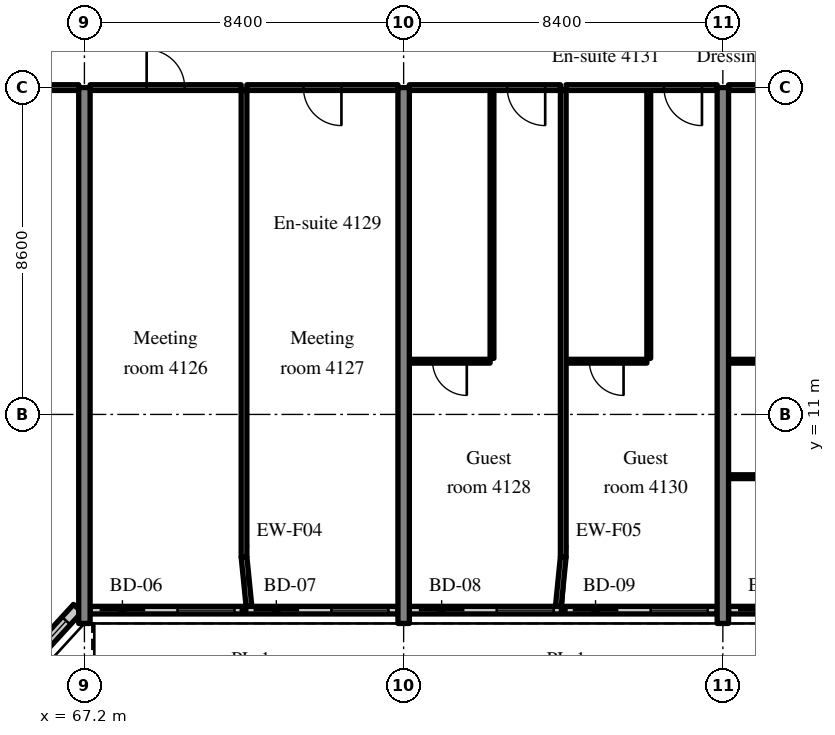
"""IFC4 building model, lengths in metres.
Left out: names, types, materials, properties, quantities, classifications, styles, units other than length and angle.
Written with IfcOpenShell. Run it as: python <this file> out.ifc"""

import sys

from ifc_helpers import new_model, si_unit, direction, frame, frame_2d, origin, place, context, subcontext, project, spatial, rectangle, extrude, source, transform, mapped, element, fill, save


model = new_model("IFC4")
c1 = context("Model", 3, precision=1e-05, world=origin(), true_north=direction((0.0, 1.0)))
c2 = subcontext(c1, "Body", "Model", "MODEL_VIEW")
j1 = project(units=[si_unit("LENGTHUNIT", "METRE"), si_unit("PLANEANGLEUNIT", "RADIAN")], contexts=[c1])
p1 = place(None, origin())
s1 = spatial("IfcSite", under=j1, at=p1, CompositionType="ELEMENT")
p2 = place(p1, origin())
s2 = spatial("IfcBuilding", under=s1, at=p2, CompositionType="ELEMENT")
p3 = place(p2, frame((0.0, 0.0, 170.6)))
s3 = spatial("IfcBuildingStorey", under=s2, at=p3, CompositionType="ELEMENT", Elevation=170.6)
m1 = source(origin(), c2, "Body", "SweptSolid", [
    extrude(rectangle(XDim=14.1, YDim=0.3, at=frame_2d((7.05, 0.0))), origin(), (0.0, 0.0, 1.0), 3.52),
])
for number, where, z_axis, x_axis in (
    (1, (67.2, 5.5, 0.0), (0.0, 0.0, 1.0), (0.0, 1.0, 0.0)),
    (2, (75.6, 5.5, 0.0), (0.0, 0.0, 1.0), (0.0, 1.0, 0.0)),
    (3, (84.0, 5.5, 0.0), (0.0, 0.0, 1.0), (0.0, 1.0, 0.0)),
):
    element("IfcWall", number, at=place(p3, frame(where, z_axis=z_axis, x_axis=x_axis)), inside=s3, PredefinedType="SHEAR", context=c2, shape_type="MappedRepresentation", body=[
        mapped(m1, transform((0.0, 0.0, 0.0), scale=1.0)),
    ])
m2 = source(origin(), c2, "Body", "SweptSolid", [
    extrude(rectangle(XDim=2.398, YDim=0.3, at=frame_2d((1.199, 0.0))), origin(), (0.0, 0.0, 1.0), 3.52),
])
p4 = place(p3, frame((65.404, 4.131, 0.0), z_axis=(0.0, 0.0, 1.0), x_axis=(0.675374189419, 0.737475222815, 0.0)))
e4 = element("IfcWall", 4, at=p4, inside=s3, PredefinedType="SOLIDWALL", context=c2, shape_type="MappedRepresentation", body=[
    mapped(m2, transform((0.0, 0.0, 0.0), scale=1.0)),
])
m3 = source(origin(), c2, "Body", "SweptSolid", [
    extrude(rectangle(XDim=1.5, YDim=2.0, at=frame_2d((0.75, 1.0))), frame((0.0, 0.16, 0.0), z_axis=(0.0, -1.0, 0.0), x_axis=(1.0, 0.0, 0.0)), (0.0, 0.0, 1.0), 0.32),
])
p5 = place(p4, frame((0.449, 0.0, 0.9)))
e5 = element("IfcOpeningElement", 5, at=p5, cuts=e4, PredefinedType="OPENING", context=c2, shape_type="MappedRepresentation", body=[
    mapped(m3, transform((0.0, 0.0, 0.0), scale=1.0)),
])
m4 = source(origin(), c2, "Body", "SweptSolid", [
    extrude(rectangle(XDim=8.1, YDim=0.2, at=frame_2d((4.05, 0.0))), origin(), (0.0, 0.0, 1.0), 2.87),
])
p6 = place(p3, frame((67.35, 5.85, 0.0), z_axis=(0.0, 0.0, 1.0), x_axis=(1.0, 0.0, 0.0)))
e6 = element("IfcWall", 6, at=p6, inside=s3, PredefinedType="SOLIDWALL", context=c2, shape_type="MappedRepresentation", body=[
    mapped(m4, transform((0.0, 0.0, 0.0), scale=1.0)),
])
m5 = source(origin(), c2, "Body", "SweptSolid", [
    extrude(rectangle(XDim=1.2, YDim=2.4, at=frame_2d((0.6, 1.2))), frame((0.0, 0.11, 0.0), z_axis=(0.0, -1.0, 0.0), x_axis=(1.0, 0.0, 0.0)), (0.0, 0.0, 1.0), 0.22),
])
p7 = place(p6, frame((0.25, 0.0, 0.0)))
e7 = element("IfcOpeningElement", 7, at=p7, cuts=e6, PredefinedType="OPENING", context=c2, shape_type="MappedRepresentation", body=[
    mapped(m5, transform((0.0, 0.0, 0.0), scale=1.0)),
])
m6 = source(origin(), c2, "Body", "SweptSolid", [
    extrude(rectangle(XDim=1.5, YDim=1.5, at=frame_2d((0.75, 0.75))), frame((0.0, 0.11, 0.0), z_axis=(0.0, -1.0, 0.0), x_axis=(1.0, 0.0, 0.0)), (0.0, 0.0, 1.0), 0.22),
])
p8 = place(p6, frame((2.3, 0.0, 0.9)))
e8 = element("IfcOpeningElement", 8, at=p8, cuts=e6, PredefinedType="OPENING", context=c2, shape_type="MappedRepresentation", body=[
    mapped(m6, transform((0.0, 0.0, 0.0), scale=1.0)),
])
p9 = place(p6, frame((4.3, 0.0, 0.0)))
e9 = element("IfcOpeningElement", 9, at=p9, cuts=e6, PredefinedType="OPENING", context=c2, shape_type="MappedRepresentation", body=[
    mapped(m5, transform((0.0, 0.0, 0.0), scale=1.0)),
])
p10 = place(p6, frame((6.35, 0.0, 0.9)))
e10 = element("IfcOpeningElement", 10, at=p10, cuts=e6, PredefinedType="OPENING", context=c2, shape_type="MappedRepresentation", body=[
    mapped(m6, transform((0.0, 0.0, 0.0), scale=1.0)),
])
m7 = source(origin(), c2, "Body", "SweptSolid", [
    extrude(rectangle(XDim=8.1, YDim=0.2, at=frame_2d((4.05, 0.0))), origin(), (0.0, 0.0, 1.0), 2.87),
])
p11 = place(p3, frame((75.75, 5.85, 0.0), z_axis=(0.0, 0.0, 1.0), x_axis=(1.0, 0.0, 0.0)))
e11 = element("IfcWall", 11, at=p11, inside=s3, PredefinedType="SOLIDWALL", context=c2, shape_type="MappedRepresentation", body=[
    mapped(m7, transform((0.0, 0.0, 0.0), scale=1.0)),
])
p12 = place(p11, frame((0.25, 0.0, 0.0)))
e12 = element("IfcOpeningElement", 12, at=p12, cuts=e11, PredefinedType="OPENING", context=c2, shape_type="MappedRepresentation", body=[
    mapped(m5, transform((0.0, 0.0, 0.0), scale=1.0)),
])
p13 = place(p11, frame((2.3, 0.0, 0.9)))
e13 = element("IfcOpeningElement", 13, at=p13, cuts=e11, PredefinedType="OPENING", context=c2, shape_type="MappedRepresentation", body=[
    mapped(m6, transform((0.0, 0.0, 0.0), scale=1.0)),
])
p14 = place(p11, frame((4.3, 0.0, 0.0)))
e14 = element("IfcOpeningElement", 14, at=p14, cuts=e11, PredefinedType="OPENING", context=c2, shape_type="MappedRepresentation", body=[
    mapped(m5, transform((0.0, 0.0, 0.0), scale=1.0)),
])
p15 = place(p11, frame((6.35, 0.0, 0.9)))
e15 = element("IfcOpeningElement", 15, at=p15, cuts=e11, PredefinedType="OPENING", context=c2, shape_type="MappedRepresentation", body=[
    mapped(m6, transform((0.0, 0.0, 0.0), scale=1.0)),
])
m8 = source(origin(), c2, "Body", "SweptSolid", [
    extrude(rectangle(XDim=4.105, YDim=0.2, at=frame_2d((2.052, 0.0))), origin(), (0.0, 0.0, 1.0), 2.87),
])
p16 = place(p3, frame((84.15, 5.85, 0.0), z_axis=(0.0, 0.0, 1.0), x_axis=(1.0, 0.0, 0.0)))
e16 = element("IfcWall", 16, at=p16, inside=s3, PredefinedType="SOLIDWALL", context=c2, shape_type="MappedRepresentation", body=[
    mapped(m8, transform((0.0, 0.0, 0.0), scale=1.0)),
])
p17 = place(p16, frame((0.25, 0.0, 0.0)))
e17 = element("IfcOpeningElement", 17, at=p17, cuts=e16, PredefinedType="OPENING", context=c2, shape_type="MappedRepresentation", body=[
    mapped(m5, transform((0.0, 0.0, 0.0), scale=1.0)),
])
p18 = place(p16, frame((2.355, 0.0, 0.9)))
e18 = element("IfcOpeningElement", 18, at=p18, cuts=e16, PredefinedType="OPENING", context=c2, shape_type="MappedRepresentation", body=[
    mapped(m6, transform((0.0, 0.0, 0.0), scale=1.0)),
])
m9 = source(origin(), c2, "Body", "SweptSolid", [
    extrude(rectangle(XDim=3.975, YDim=0.15, at=frame_2d((1.988, 0.0))), origin(), (0.0, 0.0, 1.0), 2.82),
])
p19 = place(p3, frame((63.075, 19.6, 0.0), z_axis=(0.0, 0.0, 1.0), x_axis=(1.0, 0.0, 0.0)))
e19 = element("IfcWall", 19, at=p19, inside=s3, PredefinedType="PARTITIONING", context=c2, shape_type="MappedRepresentation", body=[
    mapped(m9, transform((0.0, 0.0, 0.0), scale=1.0)),
])
m10 = source(origin(), c2, "Body", "SweptSolid", [
    extrude(rectangle(XDim=1.0, YDim=2.1, at=frame_2d((0.5, 1.05))), frame((0.0, 0.085, 0.0), z_axis=(0.0, -1.0, 0.0), x_axis=(1.0, 0.0, 0.0)), (0.0, 0.0, 1.0), 0.17),
])
p20 = place(p19, frame((1.487, 0.0, 0.0)))
e20 = element("IfcOpeningElement", 20, at=p20, cuts=e19, PredefinedType="OPENING", context=c2, shape_type="MappedRepresentation", body=[
    mapped(m10, transform((0.0, 0.0, 0.0), scale=1.0)),
])
m11 = source(origin(), c2, "Body", "SweptSolid", [
    extrude(rectangle(XDim=3.975, YDim=0.15, at=frame_2d((1.987, 0.0))), origin(), (0.0, 0.0, 1.0), 2.82),
])
p21 = place(p3, frame((67.35, 19.6, 0.0), z_axis=(0.0, 0.0, 1.0), x_axis=(1.0, 0.0, 0.0)))
e21 = element("IfcWall", 21, at=p21, inside=s3, PredefinedType="PARTITIONING", context=c2, shape_type="MappedRepresentation", body=[
    mapped(m11, transform((0.0, 0.0, 0.0), scale=1.0)),
])
p22 = place(p21, frame((1.488, 0.0, 0.0)))
e22 = element("IfcOpeningElement", 22, at=p22, cuts=e21, PredefinedType="OPENING", context=c2, shape_type="MappedRepresentation", body=[
    mapped(m10, transform((0.0, 0.0, 0.0), scale=1.0)),
])
p23 = place(p3, frame((71.475, 19.6, 0.0), z_axis=(0.0, 0.0, 1.0), x_axis=(1.0, 0.0, 0.0)))
e23 = element("IfcWall", 23, at=p23, inside=s3, PredefinedType="PARTITIONING", context=c2, shape_type="MappedRepresentation", body=[
    mapped(m11, transform((0.0, 0.0, 0.0), scale=1.0)),
])
p24 = place(p23, frame((1.488, 0.0, 0.0)))
e24 = element("IfcOpeningElement", 24, at=p24, cuts=e23, PredefinedType="OPENING", context=c2, shape_type="MappedRepresentation", body=[
    mapped(m10, transform((0.0, 0.0, 0.0), scale=1.0)),
])
m12 = source(origin(), c2, "Body", "SweptSolid", [
    extrude(rectangle(XDim=12.275, YDim=0.15, at=frame_2d((6.137, 0.0))), origin(), (0.0, 0.0, 1.0), 3.52),
])
p25 = place(p3, frame((71.4, 7.25, 0.0), z_axis=(0.0, 0.0, 1.0), x_axis=(0.0, 1.0, 0.0)))
e25 = element("IfcWall", 25, at=p25, inside=s3, PredefinedType="PARTITIONING", context=c2, shape_type="MappedRepresentation", body=[
    mapped(m12, transform((0.0, 0.0, 0.0), scale=1.0)),
])
m13 = source(origin(), c2, "Body", "SweptSolid", [
    extrude(rectangle(XDim=7.05, YDim=0.1, at=frame_2d((3.525, 0.0))), origin(), (0.0, 0.0, 1.0), 3.52),
])
p26 = place(p3, frame((77.925, 12.475, 0.0), z_axis=(0.0, 0.0, 1.0), x_axis=(0.0, 1.0, 0.0)))
e26 = element("IfcWall", 26, at=p26, inside=s3, PredefinedType="PARTITIONING", context=c2, shape_type="MappedRepresentation", body=[
    mapped(m13, transform((0.0, 0.0, 0.0), scale=1.0)),
])
m14 = source(origin(), c2, "Body", "SweptSolid", [
    extrude(rectangle(XDim=2.125, YDim=0.1, at=frame_2d((1.062, 0.0))), origin(), (0.0, 0.0, 1.0), 3.52),
])
p27 = place(p3, frame((75.75, 12.4, 0.0), z_axis=(0.0, 0.0, 1.0), x_axis=(1.0, 0.0, 0.0)))
e27 = element("IfcWall", 27, at=p27, inside=s3, PredefinedType="PARTITIONING", context=c2, shape_type="MappedRepresentation", body=[
    mapped(m14, transform((0.0, 0.0, 0.0), scale=1.0)),
])
m15 = source(origin(), c2, "Body", "SweptSolid", [
    extrude(rectangle(XDim=0.9, YDim=2.1, at=frame_2d((0.45, 1.05))), frame((0.0, 0.06, 0.0), z_axis=(0.0, -1.0, 0.0), x_axis=(1.0, 0.0, 0.0)), (0.0, 0.0, 1.0), 0.12),
])
p28 = place(p27, frame((0.612, 0.0, 0.0)))
e28 = element("IfcOpeningElement", 28, at=p28, cuts=e27, PredefinedType="OPENING", context=c2, shape_type="MappedRepresentation", body=[
    mapped(m15, transform((0.0, 0.0, 0.0), scale=1.0)),
])
p29 = place(p3, frame((75.75, 19.6, 0.0), z_axis=(0.0, 0.0, 1.0), x_axis=(1.0, 0.0, 0.0)))
e29 = element("IfcWall", 29, at=p29, inside=s3, PredefinedType="PARTITIONING", context=c2, shape_type="MappedRepresentation", body=[
    mapped(m9, transform((0.0, 0.0, 0.0), scale=1.0)),
])
p30 = place(p29, frame((2.575, 0.0, 0.0)))
e30 = element("IfcOpeningElement", 30, at=p30, cuts=e29, PredefinedType="OPENING", context=c2, shape_type="MappedRepresentation", body=[
    mapped(m10, transform((0.0, 0.0, 0.0), scale=1.0)),
])
p31 = place(p3, frame((82.05, 12.475, 0.0), z_axis=(0.0, 0.0, 1.0), x_axis=(0.0, 1.0, 0.0)))
e31 = element("IfcWall", 31, at=p31, inside=s3, PredefinedType="PARTITIONING", context=c2, shape_type="MappedRepresentation", body=[
    mapped(m13, transform((0.0, 0.0, 0.0), scale=1.0)),
])
p32 = place(p3, frame((79.875, 12.4, 0.0), z_axis=(0.0, 0.0, 1.0), x_axis=(1.0, 0.0, 0.0)))
e32 = element("IfcWall", 32, at=p32, inside=s3, PredefinedType="PARTITIONING", context=c2, shape_type="MappedRepresentation", body=[
    mapped(m14, transform((0.0, 0.0, 0.0), scale=1.0)),
])
p33 = place(p32, frame((0.612, 0.0, 0.0)))
e33 = element("IfcOpeningElement", 33, at=p33, cuts=e32, PredefinedType="OPENING", context=c2, shape_type="MappedRepresentation", body=[
    mapped(m15, transform((0.0, 0.0, 0.0), scale=1.0)),
])
p34 = place(p3, frame((79.875, 19.6, 0.0), z_axis=(0.0, 0.0, 1.0), x_axis=(1.0, 0.0, 0.0)))
e34 = element("IfcWall", 34, at=p34, inside=s3, PredefinedType="PARTITIONING", context=c2, shape_type="MappedRepresentation", body=[
    mapped(m9, transform((0.0, 0.0, 0.0), scale=1.0)),
])
p35 = place(p34, frame((2.575, 0.0, 0.0)))
e35 = element("IfcOpeningElement", 35, at=p35, cuts=e34, PredefinedType="OPENING", context=c2, shape_type="MappedRepresentation", body=[
    mapped(m10, transform((0.0, 0.0, 0.0), scale=1.0)),
])
p36 = place(p3, frame((79.8, 7.25, 0.0), z_axis=(0.0, 0.0, 1.0), x_axis=(0.0, 1.0, 0.0)))
e36 = element("IfcWall", 36, at=p36, inside=s3, PredefinedType="PARTITIONING", context=c2, shape_type="MappedRepresentation", body=[
    mapped(m12, transform((0.0, 0.0, 0.0), scale=1.0)),
])
m16 = source(origin(), c2, "Body", "SweptSolid", [
    extrude(rectangle(XDim=2.5, YDim=0.1, at=frame_2d((1.25, 0.0))), origin(), (0.0, 0.0, 1.0), 3.52),
])
p37 = place(p3, frame((84.15, 12.4, 0.0), z_axis=(0.0, 0.0, 1.0), x_axis=(1.0, 0.0, 0.0)))
e37 = element("IfcWall", 37, at=p37, inside=s3, PredefinedType="PARTITIONING", context=c2, shape_type="MappedRepresentation", body=[
    mapped(m16, transform((0.0, 0.0, 0.0), scale=1.0)),
])
p38 = place(p37, frame((0.8, 0.0, 0.0)))
e38 = element("IfcOpeningElement", 38, at=p38, cuts=e37, PredefinedType="OPENING", context=c2, shape_type="MappedRepresentation", body=[
    mapped(m15, transform((0.0, 0.0, 0.0), scale=1.0)),
])
m17 = source(origin(), c2, "Body", "SweptSolid", [
    extrude(rectangle(XDim=7.95, YDim=0.1, at=frame_2d((3.975, 0.0))), origin(), (0.0, 0.0, 1.0), 3.52),
])
p39 = place(p3, frame((84.15, 9.362, 0.0), z_axis=(0.0, 0.0, 1.0), x_axis=(1.0, 0.0, 0.0)))
e39 = element("IfcWall", 39, at=p39, inside=s3, PredefinedType="PARTITIONING", context=c2, shape_type="MappedRepresentation", body=[
    mapped(m17, transform((0.0, 0.0, 0.0), scale=1.0)),
])
m18 = source(origin(), c2, "Body", "SweptSolid", [
    extrude(rectangle(XDim=1.8, YDim=2.1, at=frame_2d((0.9, 1.05))), frame((0.0, 0.06, 0.0), z_axis=(0.0, -1.0, 0.0), x_axis=(1.0, 0.0, 0.0)), (0.0, 0.0, 1.0), 0.12),
])
p40 = place(p39, frame((3.075, 0.0, 0.0)))
e40 = element("IfcOpeningElement", 40, at=p40, cuts=e39, PredefinedType="OPENING", context=c2, shape_type="MappedRepresentation", body=[
    mapped(m18, transform((0.0, 0.0, 0.0), scale=1.0)),
])
m19 = source(origin(), c2, "Body", "SweptSolid", [
    extrude(rectangle(XDim=7.95, YDim=0.15, at=frame_2d((3.975, 0.0))), origin(), (0.0, 0.0, 1.0), 2.82),
])
p41 = place(p3, frame((84.15, 19.6, 0.0), z_axis=(0.0, 0.0, 1.0), x_axis=(1.0, 0.0, 0.0)))
e41 = element("IfcWall", 41, at=p41, inside=s3, PredefinedType="PARTITIONING", context=c2, shape_type="MappedRepresentation", body=[
    mapped(m19, transform((0.0, 0.0, 0.0), scale=1.0)),
])
p42 = place(p41, frame((6.55, 0.0, 0.0)))
e42 = element("IfcOpeningElement", 42, at=p42, cuts=e41, PredefinedType="OPENING", context=c2, shape_type="MappedRepresentation", body=[
    mapped(m10, transform((0.0, 0.0, 0.0), scale=1.0)),
])
m20 = source(origin(), c2, "Body", "SweptSolid", [
    extrude(rectangle(XDim=1.307, YDim=0.15, at=frame_2d((0.653, 0.0))), origin(), (0.0, 0.0, 1.0), 3.52),
])
for number, where, z_axis, x_axis in (
    (43, (71.53, 5.95, 0.0), (0.0, 0.0, 1.0), (-0.1, 0.995, 0.0)),
    (44, (79.67, 5.95, 0.0), (0.0, 0.0, 1.0), (0.1, 0.995, 0.0)),
):
    element("IfcWall", number, at=place(p3, frame(where, z_axis=z_axis, x_axis=x_axis)), inside=s3, PredefinedType="PARTITIONING", context=c2, shape_type="MappedRepresentation", body=[
        mapped(m20, transform((0.0, 0.0, 0.0), scale=1.0)),
    ])
m21 = source(origin(), c2, "Body", "SweptSolid", [
    extrude(rectangle(XDim=1.5, YDim=2.0, at=frame_2d((0.75, 1.0))), frame((0.0, 0.03, 0.0), z_axis=(0.0, -1.0, 0.0), x_axis=(1.0, 0.0, 0.0)), (0.0, 0.0, 1.0), 0.06),
])
p43 = place(p5, origin())
e45 = element("IfcWindow", 45, at=p43, inside=s3, PartitioningType="SINGLE_PANEL", PredefinedType="WINDOW", context=c2, shape_type="MappedRepresentation", body=[
    mapped(m21, transform((0.0, 0.0, 0.0), scale=1.0)),
])
fill(e5, e45)
m22 = source(origin(), c2, "Body", "SweptSolid", [
    extrude(rectangle(XDim=1.2, YDim=2.4, at=frame_2d((0.6, 1.2))), frame((0.0, 0.025, 0.0), z_axis=(0.0, -1.0, 0.0), x_axis=(1.0, 0.0, 0.0)), (0.0, 0.0, 1.0), 0.05),
])
p44 = place(p7, origin())
e46 = element("IfcDoor", 46, at=p44, inside=s3, OperationType="SLIDING_TO_RIGHT", PredefinedType="DOOR", context=c2, shape_type="MappedRepresentation", body=[
    mapped(m22, transform((0.0, 0.0, 0.0), scale=1.0)),
])
fill(e7, e46)
m23 = source(origin(), c2, "Body", "SweptSolid", [
    extrude(rectangle(XDim=1.5, YDim=1.5, at=frame_2d((0.75, 0.75))), frame((0.0, 0.03, 0.0), z_axis=(0.0, -1.0, 0.0), x_axis=(1.0, 0.0, 0.0)), (0.0, 0.0, 1.0), 0.06),
])
p45 = place(p8, origin())
e47 = element("IfcWindow", 47, at=p45, inside=s3, PartitioningType="SINGLE_PANEL", PredefinedType="WINDOW", context=c2, shape_type="MappedRepresentation", body=[
    mapped(m23, transform((0.0, 0.0, 0.0), scale=1.0)),
])
fill(e8, e47)
p46 = place(p9, origin())
e48 = element("IfcDoor", 48, at=p46, inside=s3, OperationType="SLIDING_TO_LEFT", PredefinedType="DOOR", context=c2, shape_type="MappedRepresentation", body=[
    mapped(m22, transform((0.0, 0.0, 0.0), scale=1.0)),
])
fill(e9, e48)
p47 = place(p10, origin())
e49 = element("IfcWindow", 49, at=p47, inside=s3, PartitioningType="SINGLE_PANEL", PredefinedType="WINDOW", context=c2, shape_type="MappedRepresentation", body=[
    mapped(m23, transform((0.0, 0.0, 0.0), scale=1.0)),
])
fill(e10, e49)
p48 = place(p12, origin())
e50 = element("IfcDoor", 50, at=p48, inside=s3, OperationType="SLIDING_TO_RIGHT", PredefinedType="DOOR", context=c2, shape_type="MappedRepresentation", body=[
    mapped(m22, transform((0.0, 0.0, 0.0), scale=1.0)),
])
fill(e12, e50)
p49 = place(p13, origin())
e51 = element("IfcWindow", 51, at=p49, inside=s3, PartitioningType="SINGLE_PANEL", PredefinedType="WINDOW", context=c2, shape_type="MappedRepresentation", body=[
    mapped(m23, transform((0.0, 0.0, 0.0), scale=1.0)),
])
fill(e13, e51)
p50 = place(p14, origin())
e52 = element("IfcDoor", 52, at=p50, inside=s3, OperationType="SLIDING_TO_LEFT", PredefinedType="DOOR", context=c2, shape_type="MappedRepresentation", body=[
    mapped(m22, transform((0.0, 0.0, 0.0), scale=1.0)),
])
fill(e14, e52)
p51 = place(p15, origin())
e53 = element("IfcWindow", 53, at=p51, inside=s3, PartitioningType="SINGLE_PANEL", PredefinedType="WINDOW", context=c2, shape_type="MappedRepresentation", body=[
    mapped(m23, transform((0.0, 0.0, 0.0), scale=1.0)),
])
fill(e15, e53)
p52 = place(p17, origin())
e54 = element("IfcDoor", 54, at=p52, inside=s3, OperationType="SLIDING_TO_RIGHT", PredefinedType="DOOR", context=c2, shape_type="MappedRepresentation", body=[
    mapped(m22, transform((0.0, 0.0, 0.0), scale=1.0)),
])
fill(e17, e54)
m24 = source(origin(), c2, "Body", "SweptSolid", [
    extrude(rectangle(XDim=1.0, YDim=2.1, at=frame_2d((0.5, 1.05))), frame((0.0, 0.025, 0.0), z_axis=(0.0, -1.0, 0.0), x_axis=(1.0, 0.0, 0.0)), (0.0, 0.0, 1.0), 0.05),
])
p53 = place(p22, origin())
e55 = element("IfcDoor", 55, at=p53, inside=s3, OperationType="SINGLE_SWING_LEFT", PredefinedType="DOOR", context=c2, shape_type="MappedRepresentation", body=[
    mapped(m24, transform((0.0, 0.0, 0.0), scale=1.0)),
])
fill(e22, e55)
p54 = place(p24, origin())
e56 = element("IfcDoor", 56, at=p54, inside=s3, OperationType="SINGLE_SWING_RIGHT", PredefinedType="DOOR", context=c2, shape_type="MappedRepresentation", body=[
    mapped(m24, transform((0.0, 0.0, 0.0), scale=1.0)),
])
fill(e24, e56)
m25 = source(origin(), c2, "Body", "SweptSolid", [
    extrude(rectangle(XDim=0.9, YDim=2.1, at=frame_2d((0.45, 1.05))), frame((0.0, 0.025, 0.0), z_axis=(0.0, -1.0, 0.0), x_axis=(1.0, 0.0, 0.0)), (0.0, 0.0, 1.0), 0.05),
])
p55 = place(p28, origin())
e57 = element("IfcDoor", 57, at=p55, inside=s3, OperationType="SINGLE_SWING_RIGHT", PredefinedType="DOOR", context=c2, shape_type="MappedRepresentation", body=[
    mapped(m25, transform((0.0, 0.0, 0.0), scale=1.0)),
])
fill(e28, e57)
p56 = place(p30, origin())
e58 = element("IfcDoor", 58, at=p56, inside=s3, OperationType="SINGLE_SWING_RIGHT", PredefinedType="DOOR", context=c2, shape_type="MappedRepresentation", body=[
    mapped(m24, transform((0.0, 0.0, 0.0), scale=1.0)),
])
fill(e30, e58)
p57 = place(p33, origin())
e59 = element("IfcDoor", 59, at=p57, inside=s3, OperationType="SINGLE_SWING_RIGHT", PredefinedType="DOOR", context=c2, shape_type="MappedRepresentation", body=[
    mapped(m25, transform((0.0, 0.0, 0.0), scale=1.0)),
])
fill(e33, e59)
p58 = place(p35, origin())
e60 = element("IfcDoor", 60, at=p58, inside=s3, OperationType="SINGLE_SWING_RIGHT", PredefinedType="DOOR", context=c2, shape_type="MappedRepresentation", body=[
    mapped(m24, transform((0.0, 0.0, 0.0), scale=1.0)),
])
fill(e35, e60)
save(model, sys.argv[1])
